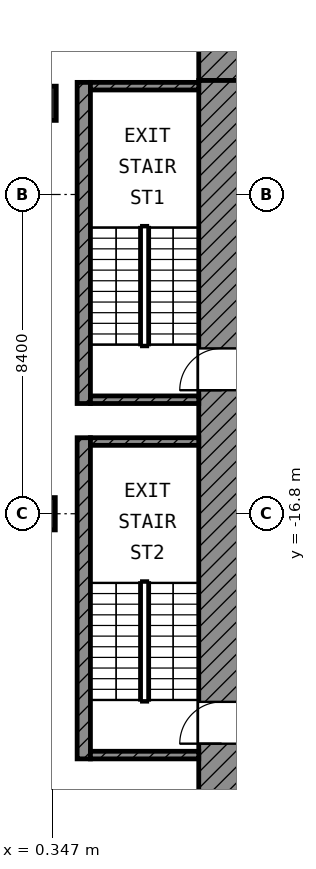
"""IFC4 building model, lengths in metres.
Left out: names, types, materials, properties, quantities, classifications, styles, units other than length and angle.
Written with IfcOpenShell. Run it as: python <this file> out.ifc"""

import sys

from ifc_helpers import new_model, si_unit, direction, frame, frame_2d, origin, origin_2d, place, context, subcontext, project, spatial, rectangle, extrude, element, fill, save


model = new_model("IFC4")
c1 = context("Model", 3, precision=1e-05, world=origin(), true_north=direction((0.0, 1.0)))
c2 = subcontext(c1, "Body", "Model", "MODEL_VIEW")
j1 = project(units=[si_unit("LENGTHUNIT", "METRE"), si_unit("PLANEANGLEUNIT", "RADIAN")], contexts=[c1])
p1 = place(None, origin())
s1 = spatial("IfcSite", under=j1, at=p1, CompositionType="ELEMENT")
p2 = place(p1, origin())
s2 = spatial("IfcBuilding", under=s1, at=p2, CompositionType="ELEMENT")
p3 = place(p2, frame((0.0, 0.0, 222.2)))
s3 = spatial("IfcBuildingStorey", under=s2, at=p3, CompositionType="ELEMENT", Elevation=222.2)
p4 = place(p3, frame((0.0, -6.0, 0.0), z_axis=(0.0, 0.0, 1.0), x_axis=(1.0, 0.0, 0.0)))
e1 = element("IfcColumn", 1, at=p4, inside=s3, PredefinedType="COLUMN", context=c2, shape_type="SweptSolid", body=[
    extrude(rectangle(XDim=0.9, YDim=0.9, at=origin_2d()), origin(), (0.0, 0.0, 1.0), 4.2),
])
p5 = place(p3, frame((0.0, -16.8, 0.0), z_axis=(0.0, 0.0, 1.0), x_axis=(1.0, 0.0, 0.0)))
e2 = element("IfcColumn", 2, at=p5, inside=s3, PredefinedType="COLUMN", context=c2, shape_type="SweptSolid", body=[
    extrude(rectangle(XDim=0.85, YDim=0.85, at=origin_2d()), origin(), (0.0, 0.0, 1.0), 4.2),
])
p6 = place(p3, frame((4.2, -4.8, 0.0), z_axis=(0.0, 0.0, 1.0), x_axis=(1.0, 0.0, 0.0)))
e3 = element("IfcWall", 3, at=p6, inside=s3, PredefinedType="SHEAR", context=c2, shape_type="SweptSolid", body=[
    extrude(rectangle(XDim=20.6, YDim=1.2, at=frame_2d((10.3, 0.0))), origin(), (0.0, 0.0, 1.0), 3.6),
])
p7 = place(p6, frame((1.95, 0.0, 0.0)))
e4 = element("IfcOpeningElement", 4, at=p7, cuts=e3, PredefinedType="OPENING", context=c2, shape_type="SweptSolid", body=[
    extrude(rectangle(XDim=1.1, YDim=2.1, at=frame_2d((0.55, 1.05))), frame((0.0, 0.61, 0.0), z_axis=(0.0, -1.0, 0.0), x_axis=(1.0, 0.0, 0.0)), (0.0, 0.0, 1.0), 1.22),
])
p8 = place(p6, frame((17.95, 0.0, 0.0)))
e5 = element("IfcOpeningElement", 5, at=p8, cuts=e3, PredefinedType="OPENING", context=c2, shape_type="SweptSolid", body=[
    extrude(rectangle(XDim=1.1, YDim=2.1, at=frame_2d((0.55, 1.05))), frame((0.0, 0.61, 0.0), z_axis=(0.0, -1.0, 0.0), x_axis=(1.0, 0.0, 0.0)), (0.0, 0.0, 1.0), 1.22),
])
p9 = place(p3, frame((4.8, -24.8, 0.0), z_axis=(0.0, 0.0, 1.0), x_axis=(0.0, 1.0, 0.0)))
e6 = element("IfcWall", 6, at=p9, inside=s3, PredefinedType="SHEAR", context=c2, shape_type="SweptSolid", body=[
    extrude(rectangle(XDim=19.4, YDim=1.2, at=frame_2d((9.7, 0.0))), origin(), (0.0, 0.0, 1.0), 3.6),
])
p10 = place(p9, frame((11.25, 0.0, 0.0)))
e7 = element("IfcOpeningElement", 7, at=p10, cuts=e6, PredefinedType="OPENING", context=c2, shape_type="SweptSolid", body=[
    extrude(rectangle(XDim=1.1, YDim=2.1, at=frame_2d((0.55, 1.05))), frame((0.0, 0.61, 0.0), z_axis=(0.0, -1.0, 0.0), x_axis=(1.0, 0.0, 0.0)), (0.0, 0.0, 1.0), 1.22),
])
p11 = place(p9, frame((1.95, 0.0, 0.0)))
e8 = element("IfcOpeningElement", 8, at=p11, cuts=e6, PredefinedType="OPENING", context=c2, shape_type="SweptSolid", body=[
    extrude(rectangle(XDim=1.1, YDim=2.1, at=frame_2d((0.55, 1.05))), frame((0.0, 0.61, 0.0), z_axis=(0.0, -1.0, 0.0), x_axis=(1.0, 0.0, 0.0)), (0.0, 0.0, 1.0), 1.22),
])
p12 = place(p3, frame((1.175, -13.9, 0.0), z_axis=(0.0, 0.0, 1.0), x_axis=(0.0, 1.0, 0.0)))
e9 = element("IfcWall", 9, at=p12, inside=s3, PredefinedType="SHEAR", context=c2, shape_type="SweptSolid", body=[
    extrude(rectangle(XDim=8.45, YDim=0.35, at=frame_2d((4.225, 0.0))), origin(), (0.0, 0.0, 1.0), 3.6),
])
for number, where, z_axis, x_axis in (
    (10, (1.35, -5.55, 0.0), (0.0, 0.0, 1.0), (1.0, 0.0, 0.0)),
    (11, (1.35, -13.8, 0.0), (0.0, 0.0, 1.0), (1.0, 0.0, 0.0)),
):
    element("IfcWall", number, at=place(p3, frame(where, z_axis=z_axis, x_axis=x_axis)), inside=s3, PredefinedType="SHEAR", context=c2, shape_type="SweptSolid", body=[
        extrude(rectangle(XDim=2.85, YDim=0.2, at=frame_2d((1.425, 0.0))), origin(), (0.0, 0.0, 1.0), 3.6),
    ])
p13 = place(p3, frame((1.175, -23.25, 0.0), z_axis=(0.0, 0.0, 1.0), x_axis=(0.0, 1.0, 0.0)))
e12 = element("IfcWall", 12, at=p13, inside=s3, PredefinedType="SHEAR", context=c2, shape_type="SweptSolid", body=[
    extrude(rectangle(XDim=8.45, YDim=0.35, at=frame_2d((4.225, 0.0))), origin(), (0.0, 0.0, 1.0), 3.6),
])
for number, where, z_axis, x_axis in (
    (13, (1.35, -14.9, 0.0), (0.0, 0.0, 1.0), (1.0, 0.0, 0.0)),
    (14, (1.35, -23.15, 0.0), (0.0, 0.0, 1.0), (1.0, 0.0, 0.0)),
):
    element("IfcWall", number, at=place(p3, frame(where, z_axis=z_axis, x_axis=x_axis)), inside=s3, PredefinedType="SHEAR", context=c2, shape_type="SweptSolid", body=[
        extrude(rectangle(XDim=2.85, YDim=0.2, at=frame_2d((1.425, 0.0))), origin(), (0.0, 0.0, 1.0), 3.6),
    ])
p14 = place(p10, origin())
e15 = element("IfcDoor", 15, at=p14, inside=s3, OperationType="SINGLE_SWING_LEFT", PredefinedType="DOOR", context=c2, shape_type="SweptSolid", body=[
    extrude(rectangle(XDim=1.1, YDim=2.1, at=frame_2d((0.55, 1.05))), frame((0.0, 0.025, 0.0), z_axis=(0.0, -1.0, 0.0), x_axis=(1.0, 0.0, 0.0)), (0.0, 0.0, 1.0), 0.05),
])
fill(e7, e15)
p15 = place(p11, origin())
e16 = element("IfcDoor", 16, at=p15, inside=s3, OperationType="SINGLE_SWING_LEFT", PredefinedType="DOOR", context=c2, shape_type="SweptSolid", body=[
    extrude(rectangle(XDim=1.1, YDim=2.1, at=frame_2d((0.55, 1.05))), frame((0.0, 0.025, 0.0), z_axis=(0.0, -1.0, 0.0), x_axis=(1.0, 0.0, 0.0)), (0.0, 0.0, 1.0), 0.05),
])
fill(e8, e16)
save(model, sys.argv[1])
